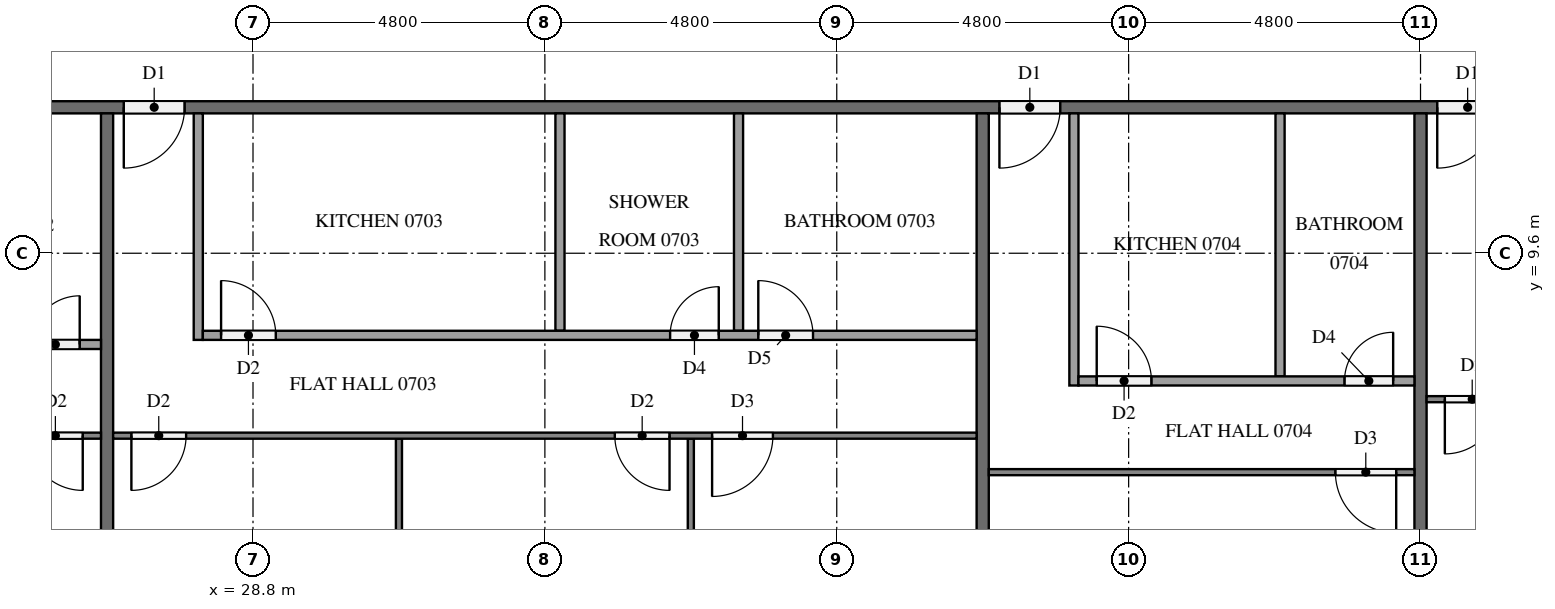
"""IFC4 building model, lengths in metres.
Left out: names, types, materials, properties, quantities, classifications, styles, units other than length and angle.
Written with IfcOpenShell. Run it as: python <this file> out.ifc"""

import sys

from ifc_helpers import new_model, si_unit, direction, frame, frame_2d, origin, place, context, subcontext, project, spatial, rectangle, extrude, element, fill, save


model = new_model("IFC4")
c1 = context("Model", 3, precision=1e-05, world=origin(), true_north=direction((0.0, 1.0)))
c2 = subcontext(c1, "Body", "Model", "MODEL_VIEW")
j1 = project(units=[si_unit("LENGTHUNIT", "METRE"), si_unit("PLANEANGLEUNIT", "RADIAN")], contexts=[c1])
p1 = place(None, origin())
s1 = spatial("IfcSite", under=j1, at=p1, CompositionType="ELEMENT")
p2 = place(p1, origin())
s2 = spatial("IfcBuilding", under=s1, at=p2, CompositionType="ELEMENT")
p3 = place(p2, frame((0.0, 0.0, 32.9)))
s3 = spatial("IfcBuildingStorey", under=s2, at=p3, CompositionType="ELEMENT", Elevation=32.9)
p4 = place(p3, frame((50.5, 12.0, 0.0), z_axis=(0.0, 0.0, 1.0), x_axis=(-1.0, 0.0, 0.0)))
e1 = element("IfcWall", 1, at=p4, inside=s3, PredefinedType="PARTITIONING", context=c2, shape_type="SweptSolid", body=[
    extrude(rectangle(XDim=38.6, YDim=0.2, at=frame_2d((19.3, 0.0))), origin(), (0.0, 0.0, 1.0), 3.2),
])
p5 = place(p4, frame((36.375, 0.0, 0.0)))
e2 = element("IfcOpeningElement", 2, at=p5, cuts=e1, PredefinedType="OPENING", context=c2, shape_type="SweptSolid", body=[
    extrude(rectangle(XDim=1.0, YDim=2.1, at=frame_2d((0.5, 1.05))), frame((0.0, 0.11, 0.0), z_axis=(0.0, -1.0, 0.0), x_axis=(1.0, 0.0, 0.0)), (0.0, 0.0, 1.0), 0.22),
])
p6 = place(p4, frame((34.825, 0.0, 0.0)))
e3 = element("IfcOpeningElement", 3, at=p6, cuts=e1, PredefinedType="OPENING", context=c2, shape_type="SweptSolid", body=[
    extrude(rectangle(XDim=1.0, YDim=2.1, at=frame_2d((0.5, 1.05))), frame((0.0, 0.11, 0.0), z_axis=(0.0, -1.0, 0.0), x_axis=(1.0, 0.0, 0.0)), (0.0, 0.0, 1.0), 0.22),
])
p7 = place(p4, frame((22.825, 0.0, 0.0)))
e4 = element("IfcOpeningElement", 4, at=p7, cuts=e1, PredefinedType="OPENING", context=c2, shape_type="SweptSolid", body=[
    extrude(rectangle(XDim=1.0, YDim=2.1, at=frame_2d((0.5, 1.05))), frame((0.0, 0.11, 0.0), z_axis=(0.0, -1.0, 0.0), x_axis=(1.0, 0.0, 0.0)), (0.0, 0.0, 1.0), 0.22),
])
p8 = place(p4, frame((8.425, 0.0, 0.0)))
e5 = element("IfcOpeningElement", 5, at=p8, cuts=e1, PredefinedType="OPENING", context=c2, shape_type="SweptSolid", body=[
    extrude(rectangle(XDim=1.0, YDim=2.1, at=frame_2d((0.5, 1.05))), frame((0.0, 0.11, 0.0), z_axis=(0.0, -1.0, 0.0), x_axis=(1.0, 0.0, 0.0)), (0.0, 0.0, 1.0), 0.22),
])
p9 = place(p4, frame((1.225, 0.0, 0.0)))
e6 = element("IfcOpeningElement", 6, at=p9, cuts=e1, PredefinedType="OPENING", context=c2, shape_type="SweptSolid", body=[
    extrude(rectangle(XDim=1.0, YDim=2.1, at=frame_2d((0.5, 1.05))), frame((0.0, 0.11, 0.0), z_axis=(0.0, -1.0, 0.0), x_axis=(1.0, 0.0, 0.0)), (0.0, 0.0, 1.0), 0.22),
])
for number, where, z_axis, x_axis in (
    (7, (26.4, 11.9, 0.0), (0.0, 0.0, 1.0), (0.0, -1.0, 0.0)),
    (8, (40.8, 11.9, 0.0), (0.0, 0.0, 1.0), (0.0, -1.0, 0.0)),
    (9, (48.0, 11.9, 0.0), (0.0, 0.0, 1.0), (0.0, -1.0, 0.0)),
):
    element("IfcWall", number, at=place(p3, frame(where, z_axis=z_axis, x_axis=x_axis)), inside=s3, PredefinedType="PARTITIONING", context=c2, shape_type="SweptSolid", body=[
        extrude(rectangle(XDim=11.8, YDim=0.2, at=frame_2d((5.9, 0.0))), origin(), (0.0, 0.0, 1.0), 3.2),
    ])
p10 = place(p3, frame((26.3, 6.6, 0.0), z_axis=(0.0, 0.0, 1.0), x_axis=(-1.0, 0.0, 0.0)))
e10 = element("IfcWall", 10, at=p10, inside=s3, PredefinedType="PARTITIONING", context=c2, shape_type="SweptSolid", body=[
    extrude(rectangle(XDim=11.8, YDim=0.1, at=frame_2d((5.9, 0.0))), origin(), (0.0, 0.0, 1.0), 3.2),
])
p11 = place(p10, frame((10.5, 0.0, 0.0)))
e11 = element("IfcOpeningElement", 11, at=p11, cuts=e10, PredefinedType="OPENING", context=c2, shape_type="SweptSolid", body=[
    extrude(rectangle(XDim=1.0, YDim=2.1, at=frame_2d((0.5, 1.05))), frame((0.0, 0.06, 0.0), z_axis=(0.0, -1.0, 0.0), x_axis=(1.0, 0.0, 0.0)), (0.0, 0.0, 1.0), 0.12),
])
p12 = place(p10, frame((0.3, 0.0, 0.0)))
e12 = element("IfcOpeningElement", 12, at=p12, cuts=e10, PredefinedType="OPENING", context=c2, shape_type="SweptSolid", body=[
    extrude(rectangle(XDim=0.9, YDim=2.1, at=frame_2d((0.45, 1.05))), frame((0.0, 0.06, 0.0), z_axis=(0.0, -1.0, 0.0), x_axis=(1.0, 0.0, 0.0)), (0.0, 0.0, 1.0), 0.12),
])
p13 = place(p3, frame((15.975, 8.1, 0.0), z_axis=(0.0, 0.0, 1.0), x_axis=(1.0, 0.0, 0.0)))
e13 = element("IfcWall", 13, at=p13, inside=s3, PredefinedType="PARTITIONING", context=c2, shape_type="SweptSolid", body=[
    extrude(rectangle(XDim=10.325, YDim=0.15, at=frame_2d((5.163, 0.0))), origin(), (0.0, 0.0, 1.0), 3.2),
])
p14 = place(p13, frame((0.3, 0.0, 0.0)))
e14 = element("IfcOpeningElement", 14, at=p14, cuts=e13, PredefinedType="OPENING", context=c2, shape_type="SweptSolid", body=[
    extrude(rectangle(XDim=0.9, YDim=2.1, at=frame_2d((0.45, 1.05))), frame((0.0, 0.085, 0.0), z_axis=(0.0, -1.0, 0.0), x_axis=(1.0, 0.0, 0.0)), (0.0, 0.0, 1.0), 0.17),
])
p15 = place(p13, frame((9.175, 0.0, 0.0)))
e15 = element("IfcOpeningElement", 15, at=p15, cuts=e13, PredefinedType="OPENING", context=c2, shape_type="SweptSolid", body=[
    extrude(rectangle(XDim=0.8, YDim=2.1, at=frame_2d((0.4, 1.05))), frame((0.0, 0.085, 0.0), z_axis=(0.0, -1.0, 0.0), x_axis=(1.0, 0.0, 0.0)), (0.0, 0.0, 1.0), 0.17),
])
for number, where, z_axis, x_axis in (
    (16, (31.2, 6.55, 0.0), (0.0, 0.0, 1.0), (0.0, -1.0, 0.0)),
    (17, (36.0, 6.55, 0.0), (0.0, 0.0, 1.0), (0.0, -1.0, 0.0)),
):
    element("IfcWall", number, at=place(p3, frame(where, z_axis=z_axis, x_axis=x_axis)), inside=s3, PredefinedType="PARTITIONING", context=c2, shape_type="SweptSolid", body=[
        extrude(rectangle(XDim=6.45, YDim=0.1, at=frame_2d((3.225, 0.0))), origin(), (0.0, 0.0, 1.0), 3.2),
    ])
p16 = place(p3, frame((40.7, 6.6, 0.0), z_axis=(0.0, 0.0, 1.0), x_axis=(-1.0, 0.0, 0.0)))
e18 = element("IfcWall", 18, at=p16, inside=s3, PredefinedType="PARTITIONING", context=c2, shape_type="SweptSolid", body=[
    extrude(rectangle(XDim=14.2, YDim=0.1, at=frame_2d((7.1, 0.0))), origin(), (0.0, 0.0, 1.0), 3.2),
])
p17 = place(p16, frame((13.0, 0.0, 0.0)))
e19 = element("IfcOpeningElement", 19, at=p17, cuts=e18, PredefinedType="OPENING", context=c2, shape_type="SweptSolid", body=[
    extrude(rectangle(XDim=0.9, YDim=2.1, at=frame_2d((0.45, 1.05))), frame((0.0, 0.06, 0.0), z_axis=(0.0, -1.0, 0.0), x_axis=(1.0, 0.0, 0.0)), (0.0, 0.0, 1.0), 0.12),
])
p18 = place(p16, frame((5.05, 0.0, 0.0)))
e20 = element("IfcOpeningElement", 20, at=p18, cuts=e18, PredefinedType="OPENING", context=c2, shape_type="SweptSolid", body=[
    extrude(rectangle(XDim=0.9, YDim=2.1, at=frame_2d((0.45, 1.05))), frame((0.0, 0.06, 0.0), z_axis=(0.0, -1.0, 0.0), x_axis=(1.0, 0.0, 0.0)), (0.0, 0.0, 1.0), 0.12),
])
p19 = place(p16, frame((3.35, 0.0, 0.0)))
e21 = element("IfcOpeningElement", 21, at=p19, cuts=e18, PredefinedType="OPENING", context=c2, shape_type="SweptSolid", body=[
    extrude(rectangle(XDim=1.0, YDim=2.1, at=frame_2d((0.5, 1.05))), frame((0.0, 0.06, 0.0), z_axis=(0.0, -1.0, 0.0), x_axis=(1.0, 0.0, 0.0)), (0.0, 0.0, 1.0), 0.12),
])
for number, where, z_axis, x_axis in (
    (22, (33.848, 11.9, 0.0), (0.0, 0.0, 1.0), (0.0, -1.0, 0.0)),
    (23, (36.785, 11.9, 0.0), (0.0, 0.0, 1.0), (0.0, -1.0, 0.0)),
):
    element("IfcWall", number, at=place(p3, frame(where, z_axis=z_axis, x_axis=x_axis)), inside=s3, PredefinedType="PARTITIONING", context=c2, shape_type="SweptSolid", body=[
        extrude(rectangle(XDim=3.575, YDim=0.15, at=frame_2d((1.788, 0.0))), origin(), (0.0, 0.0, 1.0), 3.2),
    ])
p20 = place(p3, frame((27.9, 11.9, 0.0), z_axis=(0.0, 0.0, 1.0), x_axis=(0.0, -1.0, 0.0)))
e24 = element("IfcWall", 24, at=p20, inside=s3, PredefinedType="PARTITIONING", context=c2, shape_type="SweptSolid", body=[
    extrude(rectangle(XDim=3.725, YDim=0.15, at=frame_2d((1.862, 0.0))), origin(), (0.0, 0.0, 1.0), 3.2),
])
p21 = place(p3, frame((27.975, 8.25, 0.0), z_axis=(0.0, 0.0, 1.0), x_axis=(1.0, 0.0, 0.0)))
e25 = element("IfcWall", 25, at=p21, inside=s3, PredefinedType="PARTITIONING", context=c2, shape_type="SweptSolid", body=[
    extrude(rectangle(XDim=12.725, YDim=0.15, at=frame_2d((6.362, 0.0))), origin(), (0.0, 0.0, 1.0), 3.2),
])
p22 = place(p21, frame((0.3, 0.0, 0.0)))
e26 = element("IfcOpeningElement", 26, at=p22, cuts=e25, PredefinedType="OPENING", context=c2, shape_type="SweptSolid", body=[
    extrude(rectangle(XDim=0.9, YDim=2.1, at=frame_2d((0.45, 1.05))), frame((0.0, 0.085, 0.0), z_axis=(0.0, -1.0, 0.0), x_axis=(1.0, 0.0, 0.0)), (0.0, 0.0, 1.0), 0.17),
])
p23 = place(p21, frame((7.685, 0.0, 0.0)))
e27 = element("IfcOpeningElement", 27, at=p23, cuts=e25, PredefinedType="OPENING", context=c2, shape_type="SweptSolid", body=[
    extrude(rectangle(XDim=0.8, YDim=2.1, at=frame_2d((0.4, 1.05))), frame((0.0, 0.085, 0.0), z_axis=(0.0, -1.0, 0.0), x_axis=(1.0, 0.0, 0.0)), (0.0, 0.0, 1.0), 0.17),
])
p24 = place(p21, frame((9.135, 0.0, 0.0)))
e28 = element("IfcOpeningElement", 28, at=p24, cuts=e25, PredefinedType="OPENING", context=c2, shape_type="SweptSolid", body=[
    extrude(rectangle(XDim=0.9, YDim=2.1, at=frame_2d((0.45, 1.05))), frame((0.0, 0.085, 0.0), z_axis=(0.0, -1.0, 0.0), x_axis=(1.0, 0.0, 0.0)), (0.0, 0.0, 1.0), 0.17),
])
p25 = place(p3, frame((47.9, 6.0, 0.0), z_axis=(0.0, 0.0, 1.0), x_axis=(-1.0, 0.0, 0.0)))
e29 = element("IfcWall", 29, at=p25, inside=s3, PredefinedType="PARTITIONING", context=c2, shape_type="SweptSolid", body=[
    extrude(rectangle(XDim=7.0, YDim=0.1, at=frame_2d((3.5, 0.0))), origin(), (0.0, 0.0, 1.0), 3.2),
])
p26 = place(p25, frame((0.3, 0.0, 0.0)))
e30 = element("IfcOpeningElement", 30, at=p26, cuts=e29, PredefinedType="OPENING", context=c2, shape_type="SweptSolid", body=[
    extrude(rectangle(XDim=1.0, YDim=2.1, at=frame_2d((0.5, 1.05))), frame((0.0, 0.06, 0.0), z_axis=(0.0, -1.0, 0.0), x_axis=(1.0, 0.0, 0.0)), (0.0, 0.0, 1.0), 0.12),
])
p27 = place(p3, frame((45.69, 11.9, 0.0), z_axis=(0.0, 0.0, 1.0), x_axis=(0.0, -1.0, 0.0)))
e31 = element("IfcWall", 31, at=p27, inside=s3, PredefinedType="PARTITIONING", context=c2, shape_type="SweptSolid", body=[
    extrude(rectangle(XDim=4.325, YDim=0.15, at=frame_2d((2.163, 0.0))), origin(), (0.0, 0.0, 1.0), 3.2),
])
p28 = place(p3, frame((42.3, 11.9, 0.0), z_axis=(0.0, 0.0, 1.0), x_axis=(0.0, -1.0, 0.0)))
e32 = element("IfcWall", 32, at=p28, inside=s3, PredefinedType="PARTITIONING", context=c2, shape_type="SweptSolid", body=[
    extrude(rectangle(XDim=4.475, YDim=0.15, at=frame_2d((2.237, 0.0))), origin(), (0.0, 0.0, 1.0), 3.2),
])
p29 = place(p3, frame((42.375, 7.5, 0.0), z_axis=(0.0, 0.0, 1.0), x_axis=(1.0, 0.0, 0.0)))
e33 = element("IfcWall", 33, at=p29, inside=s3, PredefinedType="PARTITIONING", context=c2, shape_type="SweptSolid", body=[
    extrude(rectangle(XDim=5.525, YDim=0.15, at=frame_2d((2.762, 0.0))), origin(), (0.0, 0.0, 1.0), 3.2),
])
p30 = place(p29, frame((0.3, 0.0, 0.0)))
e34 = element("IfcOpeningElement", 34, at=p30, cuts=e33, PredefinedType="OPENING", context=c2, shape_type="SweptSolid", body=[
    extrude(rectangle(XDim=0.9, YDim=2.1, at=frame_2d((0.45, 1.05))), frame((0.0, 0.085, 0.0), z_axis=(0.0, -1.0, 0.0), x_axis=(1.0, 0.0, 0.0)), (0.0, 0.0, 1.0), 0.17),
])
p31 = place(p29, frame((4.375, 0.0, 0.0)))
e35 = element("IfcOpeningElement", 35, at=p31, cuts=e33, PredefinedType="OPENING", context=c2, shape_type="SweptSolid", body=[
    extrude(rectangle(XDim=0.8, YDim=2.1, at=frame_2d((0.4, 1.05))), frame((0.0, 0.085, 0.0), z_axis=(0.0, -1.0, 0.0), x_axis=(1.0, 0.0, 0.0)), (0.0, 0.0, 1.0), 0.17),
])
p32 = place(p3, frame((57.5, 7.2, 0.0), z_axis=(0.0, 0.0, 1.0), x_axis=(-1.0, 0.0, 0.0)))
e36 = element("IfcWall", 36, at=p32, inside=s3, PredefinedType="PARTITIONING", context=c2, shape_type="SweptSolid", body=[
    extrude(rectangle(XDim=9.4, YDim=0.1, at=frame_2d((4.7, 0.0))), origin(), (0.0, 0.0, 1.0), 3.2),
])
p33 = place(p32, frame((8.2, 0.0, 0.0)))
e37 = element("IfcOpeningElement", 37, at=p33, cuts=e36, PredefinedType="OPENING", context=c2, shape_type="SweptSolid", body=[
    extrude(rectangle(XDim=0.9, YDim=2.1, at=frame_2d((0.45, 1.05))), frame((0.0, 0.06, 0.0), z_axis=(0.0, -1.0, 0.0), x_axis=(1.0, 0.0, 0.0)), (0.0, 0.0, 1.0), 0.12),
])
p34 = place(p32, frame((0.3, 0.0, 0.0)))
e38 = element("IfcOpeningElement", 38, at=p34, cuts=e36, PredefinedType="OPENING", context=c2, shape_type="SweptSolid", body=[
    extrude(rectangle(XDim=1.0, YDim=2.1, at=frame_2d((0.5, 1.05))), frame((0.0, 0.06, 0.0), z_axis=(0.0, -1.0, 0.0), x_axis=(1.0, 0.0, 0.0)), (0.0, 0.0, 1.0), 0.12),
])
p35 = place(p7, origin())
e39 = element("IfcDoor", 39, at=p35, inside=s3, OperationType="SINGLE_SWING_RIGHT", PredefinedType="DOOR", context=c2, shape_type="SweptSolid", body=[
    extrude(rectangle(XDim=1.0, YDim=2.1, at=frame_2d((0.5, 1.05))), frame((0.0, 0.025, 0.0), z_axis=(0.0, -1.0, 0.0), x_axis=(1.0, 0.0, 0.0)), (0.0, 0.0, 1.0), 0.05),
])
fill(e4, e39)
p36 = place(p8, origin())
e40 = element("IfcDoor", 40, at=p36, inside=s3, OperationType="SINGLE_SWING_RIGHT", PredefinedType="DOOR", context=c2, shape_type="SweptSolid", body=[
    extrude(rectangle(XDim=1.0, YDim=2.1, at=frame_2d((0.5, 1.05))), frame((0.0, 0.025, 0.0), z_axis=(0.0, -1.0, 0.0), x_axis=(1.0, 0.0, 0.0)), (0.0, 0.0, 1.0), 0.05),
])
fill(e5, e40)
p37 = place(p9, origin())
e41 = element("IfcDoor", 41, at=p37, inside=s3, OperationType="SINGLE_SWING_RIGHT", PredefinedType="DOOR", context=c2, shape_type="SweptSolid", body=[
    extrude(rectangle(XDim=1.0, YDim=2.1, at=frame_2d((0.5, 1.05))), frame((0.0, 0.025, 0.0), z_axis=(0.0, -1.0, 0.0), x_axis=(1.0, 0.0, 0.0)), (0.0, 0.0, 1.0), 0.05),
])
fill(e6, e41)
p38 = place(p12, origin())
e42 = element("IfcDoor", 42, at=p38, inside=s3, OperationType="SINGLE_SWING_LEFT", PredefinedType="DOOR", context=c2, shape_type="SweptSolid", body=[
    extrude(rectangle(XDim=0.9, YDim=2.1, at=frame_2d((0.45, 1.05))), frame((0.0, 0.025, 0.0), z_axis=(0.0, -1.0, 0.0), x_axis=(1.0, 0.0, 0.0)), (0.0, 0.0, 1.0), 0.05),
])
fill(e12, e42)
p39 = place(p15, origin())
e43 = element("IfcDoor", 43, at=p39, inside=s3, OperationType="SINGLE_SWING_RIGHT", PredefinedType="DOOR", context=c2, shape_type="SweptSolid", body=[
    extrude(rectangle(XDim=0.8, YDim=2.1, at=frame_2d((0.4, 1.05))), frame((0.0, 0.025, 0.0), z_axis=(0.0, -1.0, 0.0), x_axis=(1.0, 0.0, 0.0)), (0.0, 0.0, 1.0), 0.05),
])
fill(e15, e43)
p40 = place(p17, origin())
e44 = element("IfcDoor", 44, at=p40, inside=s3, OperationType="SINGLE_SWING_RIGHT", PredefinedType="DOOR", context=c2, shape_type="SweptSolid", body=[
    extrude(rectangle(XDim=0.9, YDim=2.1, at=frame_2d((0.45, 1.05))), frame((0.0, 0.025, 0.0), z_axis=(0.0, -1.0, 0.0), x_axis=(1.0, 0.0, 0.0)), (0.0, 0.0, 1.0), 0.05),
])
fill(e19, e44)
p41 = place(p18, origin())
e45 = element("IfcDoor", 45, at=p41, inside=s3, OperationType="SINGLE_SWING_LEFT", PredefinedType="DOOR", context=c2, shape_type="SweptSolid", body=[
    extrude(rectangle(XDim=0.9, YDim=2.1, at=frame_2d((0.45, 1.05))), frame((0.0, 0.025, 0.0), z_axis=(0.0, -1.0, 0.0), x_axis=(1.0, 0.0, 0.0)), (0.0, 0.0, 1.0), 0.05),
])
fill(e20, e45)
p42 = place(p19, origin())
e46 = element("IfcDoor", 46, at=p42, inside=s3, OperationType="SINGLE_SWING_RIGHT", PredefinedType="DOOR", context=c2, shape_type="SweptSolid", body=[
    extrude(rectangle(XDim=1.0, YDim=2.1, at=frame_2d((0.5, 1.05))), frame((0.0, 0.025, 0.0), z_axis=(0.0, -1.0, 0.0), x_axis=(1.0, 0.0, 0.0)), (0.0, 0.0, 1.0), 0.05),
])
fill(e21, e46)
p43 = place(p22, origin())
e47 = element("IfcDoor", 47, at=p43, inside=s3, OperationType="SINGLE_SWING_LEFT", PredefinedType="DOOR", context=c2, shape_type="SweptSolid", body=[
    extrude(rectangle(XDim=0.9, YDim=2.1, at=frame_2d((0.45, 1.05))), frame((0.0, 0.025, 0.0), z_axis=(0.0, -1.0, 0.0), x_axis=(1.0, 0.0, 0.0)), (0.0, 0.0, 1.0), 0.05),
])
fill(e26, e47)
p44 = place(p23, origin())
e48 = element("IfcDoor", 48, at=p44, inside=s3, OperationType="SINGLE_SWING_RIGHT", PredefinedType="DOOR", context=c2, shape_type="SweptSolid", body=[
    extrude(rectangle(XDim=0.8, YDim=2.1, at=frame_2d((0.4, 1.05))), frame((0.0, 0.025, 0.0), z_axis=(0.0, -1.0, 0.0), x_axis=(1.0, 0.0, 0.0)), (0.0, 0.0, 1.0), 0.05),
])
fill(e27, e48)
p45 = place(p24, origin())
e49 = element("IfcDoor", 49, at=p45, inside=s3, OperationType="SINGLE_SWING_LEFT", PredefinedType="DOOR", context=c2, shape_type="SweptSolid", body=[
    extrude(rectangle(XDim=0.9, YDim=2.1, at=frame_2d((0.45, 1.05))), frame((0.0, 0.025, 0.0), z_axis=(0.0, -1.0, 0.0), x_axis=(1.0, 0.0, 0.0)), (0.0, 0.0, 1.0), 0.05),
])
fill(e28, e49)
p46 = place(p26, origin())
e50 = element("IfcDoor", 50, at=p46, inside=s3, OperationType="SINGLE_SWING_LEFT", PredefinedType="DOOR", context=c2, shape_type="SweptSolid", body=[
    extrude(rectangle(XDim=1.0, YDim=2.1, at=frame_2d((0.5, 1.05))), frame((0.0, 0.025, 0.0), z_axis=(0.0, -1.0, 0.0), x_axis=(1.0, 0.0, 0.0)), (0.0, 0.0, 1.0), 0.05),
])
fill(e30, e50)
p47 = place(p30, origin())
e51 = element("IfcDoor", 51, at=p47, inside=s3, OperationType="SINGLE_SWING_LEFT", PredefinedType="DOOR", context=c2, shape_type="SweptSolid", body=[
    extrude(rectangle(XDim=0.9, YDim=2.1, at=frame_2d((0.45, 1.05))), frame((0.0, 0.025, 0.0), z_axis=(0.0, -1.0, 0.0), x_axis=(1.0, 0.0, 0.0)), (0.0, 0.0, 1.0), 0.05),
])
fill(e34, e51)
p48 = place(p31, origin())
e52 = element("IfcDoor", 52, at=p48, inside=s3, OperationType="SINGLE_SWING_RIGHT", PredefinedType="DOOR", context=c2, shape_type="SweptSolid", body=[
    extrude(rectangle(XDim=0.8, YDim=2.1, at=frame_2d((0.4, 1.05))), frame((0.0, 0.025, 0.0), z_axis=(0.0, -1.0, 0.0), x_axis=(1.0, 0.0, 0.0)), (0.0, 0.0, 1.0), 0.05),
])
fill(e35, e52)
p49 = place(p33, origin())
e53 = element("IfcDoor", 53, at=p49, inside=s3, OperationType="SINGLE_SWING_RIGHT", PredefinedType="DOOR", context=c2, shape_type="SweptSolid", body=[
    extrude(rectangle(XDim=0.9, YDim=2.1, at=frame_2d((0.45, 1.05))), frame((0.0, 0.025, 0.0), z_axis=(0.0, -1.0, 0.0), x_axis=(1.0, 0.0, 0.0)), (0.0, 0.0, 1.0), 0.05),
])
fill(e37, e53)
save(model, sys.argv[1])
